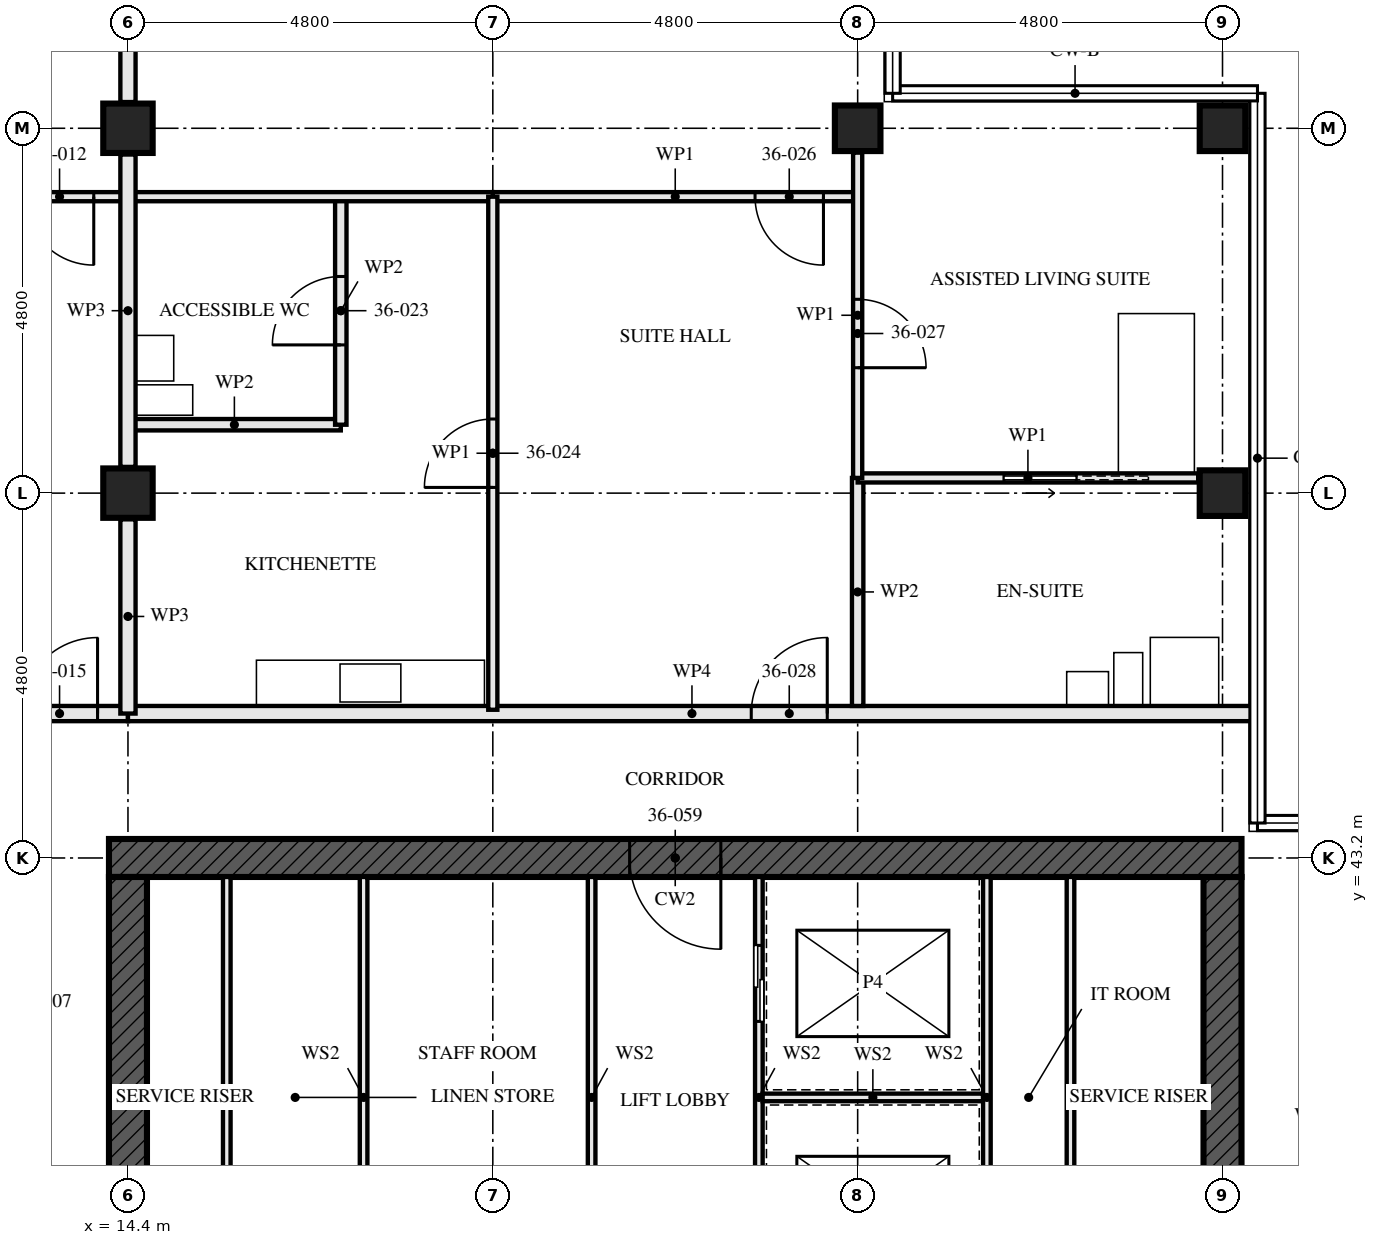
"""IFC4 building model, lengths in metres.
Left out: names, types, materials, properties, quantities, classifications, styles, units other than length and angle.
Written with IfcOpenShell. Run it as: python <this file> out.ifc"""

import sys

from ifc_helpers import new_model, si_unit, direction, frame, frame_2d, origin, origin_2d, place, context, subcontext, project, spatial, rectangle, hollow_rectangle, extrude, element, fill, save


model = new_model("IFC4")
c1 = context("Model", 3, precision=1e-05, world=origin(), true_north=direction((0.0, 1.0)))
c2 = subcontext(c1, "Body", "Model", "MODEL_VIEW")
j1 = project(units=[si_unit("LENGTHUNIT", "METRE"), si_unit("PLANEANGLEUNIT", "RADIAN")], contexts=[c1])
p1 = place(None, origin())
s1 = spatial("IfcSite", under=j1, at=p1, CompositionType="ELEMENT")
p2 = place(p1, origin())
s2 = spatial("IfcBuilding", under=s1, at=p2, CompositionType="ELEMENT")
p3 = place(p2, frame((0.0, 0.0, 133.0)))
s3 = spatial("IfcBuildingStorey", under=s2, at=p3, CompositionType="ELEMENT", Elevation=133.0)
for number, where, z_axis, x_axis in (
    (1, (14.4, 48.0, 0.0), (0.0, 0.0, 1.0), (1.0, 0.0, 0.0)),
    (2, (14.4, 52.8, 0.0), (0.0, 0.0, 1.0), (1.0, 0.0, 0.0)),
):
    element("IfcColumn", number, at=place(p3, frame(where, z_axis=z_axis, x_axis=x_axis)), inside=s3, PredefinedType="COLUMN", context=c2, shape_type="SweptSolid", body=[
        extrude(hollow_rectangle(XDim=0.65, YDim=0.65, WallThickness=0.05, at=origin_2d()), origin(), (0.0, 0.0, 1.0), 3.5),
    ])
for number, where, z_axis, x_axis in (
    (3, (24.0, 52.8, 0.0), (0.0, 0.0, 1.0), (0.0, 1.0, 0.0)),
    (4, (28.8, 48.0, 0.0), (0.0, 0.0, 1.0), (1.0, 0.0, 0.0)),
    (5, (28.8, 52.8, 0.0), (0.0, 0.0, 1.0), (0.0, 1.0, 0.0)),
):
    element("IfcColumn", number, at=place(p3, frame(where, z_axis=z_axis, x_axis=x_axis)), inside=s3, PredefinedType="COLUMN", context=c2, shape_type="SweptSolid", body=[
        extrude(hollow_rectangle(XDim=0.6, YDim=0.6, WallThickness=0.08, at=origin_2d()), origin(), (0.0, 0.0, 1.0), 3.5),
    ])
p4 = place(p3, frame((29.05, 43.2, -0.17), z_axis=(0.0, 0.0, 1.0), x_axis=(-1.0, 0.0, 0.0)))
e6 = element("IfcWall", 6, at=p4, inside=s3, PredefinedType="SHEAR", context=c2, shape_type="SweptSolid", body=[
    extrude(rectangle(XDim=14.9, YDim=0.5, at=frame_2d((7.45, 0.0))), origin(), (0.0, 0.0, 1.0), 3.42),
])
p5 = place(p4, frame((6.85, 0.0, 0.17)))
e7 = element("IfcOpeningElement", 7, at=p5, cuts=e6, PredefinedType="OPENING", context=c2, shape_type="SweptSolid", body=[
    extrude(rectangle(XDim=1.2, YDim=2.1, at=frame_2d((0.6, 1.05))), frame((0.0, 0.26, 0.0), z_axis=(0.0, -1.0, 0.0), x_axis=(1.0, 0.0, 0.0)), (0.0, 0.0, 1.0), 0.521),
])
p6 = place(p3, frame((14.4, 42.95, -0.17), z_axis=(0.0, 0.0, 1.0), x_axis=(0.0, -1.0, 0.0)))
e8 = element("IfcWall", 8, at=p6, inside=s3, PredefinedType="SHEAR", context=c2, shape_type="SweptSolid", body=[
    extrude(rectangle(XDim=13.9, YDim=0.5, at=frame_2d((6.95, 0.0))), origin(), (0.0, 0.0, 1.0), 3.42),
])
p7 = place(p6, frame((6.35, 0.0, 0.17)))
e9 = element("IfcOpeningElement", 9, at=p7, cuts=e8, PredefinedType="OPENING", context=c2, shape_type="SweptSolid", body=[
    extrude(rectangle(XDim=1.2, YDim=2.1, at=frame_2d((0.6, 1.05))), frame((0.0, 0.26, 0.0), z_axis=(0.0, -1.0, 0.0), x_axis=(1.0, 0.0, 0.0)), (0.0, 0.0, 1.0), 0.521),
])
p8 = place(p3, frame((28.8, 29.05, -0.17), z_axis=(0.0, 0.0, 1.0), x_axis=(0.0, 1.0, 0.0)))
e10 = element("IfcWall", 10, at=p8, inside=s3, PredefinedType="SHEAR", context=c2, shape_type="SweptSolid", body=[
    extrude(rectangle(XDim=13.9, YDim=0.5, at=frame_2d((6.95, 0.0))), origin(), (0.0, 0.0, 1.0), 3.42),
])
p9 = place(p8, frame((6.35, 0.0, 0.17)))
e11 = element("IfcOpeningElement", 11, at=p9, cuts=e10, PredefinedType="OPENING", context=c2, shape_type="SweptSolid", body=[
    extrude(rectangle(XDim=1.2, YDim=2.1, at=frame_2d((0.6, 1.05))), frame((0.0, 0.26, 0.0), z_axis=(0.0, -1.0, 0.0), x_axis=(1.0, 0.0, 0.0)), (0.0, 0.0, 1.0), 0.521),
])
p10 = place(p3, frame((14.4, 51.9, 0.0), z_axis=(0.0, 0.0, 1.0), x_axis=(-1.0, 0.0, 0.0)))
e12 = element("IfcWall", 12, at=p10, inside=s3, PredefinedType="PARTITIONING", context=c2, shape_type="SweptSolid", body=[
    extrude(rectangle(XDim=4.8, YDim=0.12, at=frame_2d((2.4, 0.0))), origin(), (0.0, 0.0, 1.0), 3.25),
])
p11 = place(p10, frame((0.45, 0.0, 0.0)))
e13 = element("IfcOpeningElement", 13, at=p11, cuts=e12, PredefinedType="OPENING", context=c2, shape_type="SweptSolid", body=[
    extrude(rectangle(XDim=0.9, YDim=2.1, at=frame_2d((0.45, 1.05))), frame((0.0, 0.071, 0.0), z_axis=(0.0, -1.0, 0.0), x_axis=(1.0, 0.0, 0.0)), (0.0, 0.0, 1.0), 0.141),
])
p12 = place(p10, frame((2.925, 0.0, 0.0)))
e14 = element("IfcOpeningElement", 14, at=p12, cuts=e12, PredefinedType="OPENING", context=c2, shape_type="SweptSolid", body=[
    extrude(rectangle(XDim=0.95, YDim=2.1, at=frame_2d((0.475, 1.05))), frame((0.0, 0.071, 0.0), z_axis=(0.0, -1.0, 0.0), x_axis=(1.0, 0.0, 0.0)), (0.0, 0.0, 1.0), 0.141),
])
p13 = place(p3, frame((14.4, 45.1, 0.0), z_axis=(0.0, 0.0, 1.0), x_axis=(-1.0, 0.0, 0.0)))
e15 = element("IfcWall", 15, at=p13, inside=s3, PredefinedType="PARTITIONING", context=c2, shape_type="SweptSolid", body=[
    extrude(rectangle(XDim=9.6, YDim=0.2, at=frame_2d((4.8, 0.0))), origin(), (0.0, 0.0, 1.0), 3.25),
])
p14 = place(p13, frame((0.4, 0.0, 0.0)))
e16 = element("IfcOpeningElement", 16, at=p14, cuts=e15, PredefinedType="OPENING", context=c2, shape_type="SweptSolid", body=[
    extrude(rectangle(XDim=1.0, YDim=2.1, at=frame_2d((0.5, 1.05))), frame((0.0, 0.111, 0.0), z_axis=(0.0, -1.0, 0.0), x_axis=(1.0, 0.0, 0.0)), (0.0, 0.0, 1.0), 0.221),
])
p15 = place(p3, frame((24.0, 48.2, 0.0), z_axis=(0.0, 0.0, 1.0), x_axis=(0.0, -1.0, 0.0)))
e17 = element("IfcWall", 17, at=p15, inside=s3, PredefinedType="PARTITIONING", context=c2, shape_type="SweptSolid", body=[
    extrude(rectangle(XDim=3.0, YDim=0.15, at=frame_2d((1.5, 0.0))), origin(), (0.0, 0.0, 1.0), 2.04),
])
p16 = place(p3, frame((17.2, 51.9, 0.0), z_axis=(0.0, 0.0, 1.0), x_axis=(0.0, -1.0, 0.0)))
e18 = element("IfcWall", 18, at=p16, inside=s3, PredefinedType="PARTITIONING", context=c2, shape_type="SweptSolid", body=[
    extrude(rectangle(XDim=3.0, YDim=0.15, at=frame_2d((1.5, 0.0))), origin(), (0.0, 0.0, 1.0), 3.25),
])
p17 = place(p16, frame((1.05, 0.0, 0.0)))
e19 = element("IfcOpeningElement", 19, at=p17, cuts=e18, PredefinedType="OPENING", context=c2, shape_type="SweptSolid", body=[
    extrude(rectangle(XDim=0.9, YDim=2.1, at=frame_2d((0.45, 1.05))), frame((0.0, 0.085, 0.0), z_axis=(0.0, -1.0, 0.0), x_axis=(1.0, 0.0, 0.0)), (0.0, 0.0, 1.0), 0.171),
])
p18 = place(p3, frame((17.2, 48.9, 0.0), z_axis=(0.0, 0.0, 1.0), x_axis=(-1.0, 0.0, 0.0)))
e20 = element("IfcWall", 20, at=p18, inside=s3, PredefinedType="PARTITIONING", context=c2, shape_type="SweptSolid", body=[
    extrude(rectangle(XDim=2.8, YDim=0.15, at=frame_2d((1.4, 0.0))), origin(), (0.0, 0.0, 1.0), 3.25),
])
p19 = place(p3, frame((19.2, 51.9, 0.0), z_axis=(0.0, 0.0, 1.0), x_axis=(0.0, -1.0, 0.0)))
e21 = element("IfcWall", 21, at=p19, inside=s3, PredefinedType="PARTITIONING", context=c2, shape_type="SweptSolid", body=[
    extrude(rectangle(XDim=6.75, YDim=0.12, at=frame_2d((3.375, 0.0))), origin(), (0.0, 0.0, 1.0), 2.04),
])
p20 = place(p19, frame((2.925, 0.0, 0.0)))
e22 = element("IfcOpeningElement", 22, at=p20, cuts=e21, PredefinedType="OPENING", context=c2, shape_type="SweptSolid", body=[
    extrude(rectangle(XDim=0.9, YDim=2.0, at=frame_2d((0.45, 1.0))), frame((0.0, 0.071, 0.0), z_axis=(0.0, -1.0, 0.0), x_axis=(1.0, 0.0, 0.0)), (0.0, 0.0, 1.0), 0.141),
])
p21 = place(p3, frame((28.48, 48.2, 0.0), z_axis=(0.0, 0.0, 1.0), x_axis=(-1.0, 0.0, 0.0)))
e23 = element("IfcWall", 23, at=p21, inside=s3, PredefinedType="PARTITIONING", context=c2, shape_type="SweptSolid", body=[
    extrude(rectangle(XDim=4.48, YDim=0.12, at=frame_2d((2.24, 0.0))), origin(), (0.0, 0.0, 1.0), 2.04),
])
p22 = place(p21, frame((1.605, 0.0, 0.0)))
e24 = element("IfcOpeningElement", 24, at=p22, cuts=e23, PredefinedType="OPENING", context=c2, shape_type="SweptSolid", body=[
    extrude(rectangle(XDim=0.95, YDim=2.0, at=frame_2d((0.475, 1.0))), frame((0.0, 0.071, 0.0), z_axis=(0.0, -1.0, 0.0), x_axis=(1.0, 0.0, 0.0)), (0.0, 0.0, 1.0), 0.141),
])
p23 = place(p3, frame((24.0, 51.9, 0.0), z_axis=(0.0, 0.0, 1.0), x_axis=(-1.0, 0.0, 0.0)))
e25 = element("IfcWall", 25, at=p23, inside=s3, PredefinedType="PARTITIONING", context=c2, shape_type="SweptSolid", body=[
    extrude(rectangle(XDim=4.8, YDim=0.12, at=frame_2d((2.4, 0.0))), origin(), (0.0, 0.0, 1.0), 3.25),
])
p24 = place(p23, frame((0.45, 0.0, 0.0)))
e26 = element("IfcOpeningElement", 26, at=p24, cuts=e25, PredefinedType="OPENING", context=c2, shape_type="SweptSolid", body=[
    extrude(rectangle(XDim=0.9, YDim=2.1, at=frame_2d((0.45, 1.05))), frame((0.0, 0.071, 0.0), z_axis=(0.0, -1.0, 0.0), x_axis=(1.0, 0.0, 0.0)), (0.0, 0.0, 1.0), 0.141),
])
p25 = place(p3, frame((19.2, 51.9, 0.0), z_axis=(0.0, 0.0, 1.0), x_axis=(-1.0, 0.0, 0.0)))
e27 = element("IfcWall", 27, at=p25, inside=s3, PredefinedType="PARTITIONING", context=c2, shape_type="SweptSolid", body=[
    extrude(rectangle(XDim=4.8, YDim=0.12, at=frame_2d((2.4, 0.0))), origin(), (0.0, 0.0, 1.0), 3.25),
])
p26 = place(p3, frame((24.0, 52.48, 0.0), z_axis=(0.0, 0.0, 1.0), x_axis=(0.0, -1.0, 0.0)))
e28 = element("IfcWall", 28, at=p26, inside=s3, PredefinedType="PARTITIONING", context=c2, shape_type="SweptSolid", body=[
    extrude(rectangle(XDim=4.28, YDim=0.12, at=frame_2d((2.14, 0.0))), origin(), (0.0, 0.0, 1.0), 3.25),
])
p27 = place(p26, frame((1.93, 0.0, 0.0)))
e29 = element("IfcOpeningElement", 29, at=p27, cuts=e28, PredefinedType="OPENING", context=c2, shape_type="SweptSolid", body=[
    extrude(rectangle(XDim=0.9, YDim=2.1, at=frame_2d((0.45, 1.05))), frame((0.0, 0.071, 0.0), z_axis=(0.0, -1.0, 0.0), x_axis=(1.0, 0.0, 0.0)), (0.0, 0.0, 1.0), 0.141),
])
p28 = place(p3, frame((29.24, 45.1, 0.0), z_axis=(0.0, 0.0, 1.0), x_axis=(-1.0, 0.0, 0.0)))
e30 = element("IfcWall", 30, at=p28, inside=s3, PredefinedType="PARTITIONING", context=c2, shape_type="SweptSolid", body=[
    extrude(rectangle(XDim=14.84, YDim=0.2, at=frame_2d((7.42, 0.0))), origin(), (0.0, 0.0, 1.0), 2.04),
])
p29 = place(p28, frame((5.64, 0.0, 0.0)))
e31 = element("IfcOpeningElement", 31, at=p29, cuts=e30, PredefinedType="OPENING", context=c2, shape_type="SweptSolid", body=[
    extrude(rectangle(XDim=1.0, YDim=2.0, at=frame_2d((0.5, 1.0))), frame((0.0, 0.111, 0.0), z_axis=(0.0, -1.0, 0.0), x_axis=(1.0, 0.0, 0.0)), (0.0, 0.0, 1.0), 0.221),
])
for number, where, z_axis, x_axis in (
    (32, (15.7, 37.15, 0.0), (0.0, 0.0, 1.0), (0.0, 1.0, 0.0)),
    (33, (26.8, 37.15, 0.0), (0.0, 0.0, 1.0), (0.0, 1.0, 0.0)),
):
    element("IfcWall", number, at=place(p3, frame(where, z_axis=z_axis, x_axis=x_axis)), inside=s3, PredefinedType="SOLIDWALL", context=c2, shape_type="SweptSolid", body=[
        extrude(rectangle(XDim=5.8, YDim=0.1, at=frame_2d((2.9, 0.0))), origin(), (0.0, 0.0, 1.0), 3.25),
    ])
p30 = place(p3, frame((20.5, 37.15, 0.0), z_axis=(0.0, 0.0, 1.0), x_axis=(0.0, 1.0, 0.0)))
e34 = element("IfcWall", 34, at=p30, inside=s3, PredefinedType="SOLIDWALL", context=c2, shape_type="SweptSolid", body=[
    extrude(rectangle(XDim=5.8, YDim=0.1, at=frame_2d((2.9, 0.0))), origin(), (0.0, 0.0, 1.0), 3.25),
])
p31 = place(p30, frame((0.975, 0.0, 0.0)))
e35 = element("IfcOpeningElement", 35, at=p31, cuts=e34, PredefinedType="OPENING", context=c2, shape_type="SweptSolid", body=[
    extrude(rectangle(XDim=0.9, YDim=2.1, at=frame_2d((0.45, 1.05))), frame((0.0, 0.061, 0.0), z_axis=(0.0, -1.0, 0.0), x_axis=(1.0, 0.0, 0.0)), (0.0, 0.0, 1.0), 0.121),
])
p32 = place(p3, frame((22.7, 37.15, 0.0), z_axis=(0.0, 0.0, 1.0), x_axis=(0.0, 1.0, 0.0)))
e36 = element("IfcWall", 36, at=p32, inside=s3, PredefinedType="SOLIDWALL", context=c2, shape_type="SweptSolid", body=[
    extrude(rectangle(XDim=5.8, YDim=0.1, at=frame_2d((2.9, 0.0))), origin(), (0.0, 0.0, 1.0), 3.25),
])
p33 = place(p32, frame((0.925, 0.0, 0.0)))
e37 = element("IfcOpeningElement", 37, at=p33, cuts=e36, PredefinedType="OPENING", context=c2, shape_type="SweptSolid", body=[
    extrude(rectangle(XDim=1.0, YDim=2.1, at=frame_2d((0.5, 1.05))), frame((0.0, 0.061, 0.0), z_axis=(0.0, -1.0, 0.0), x_axis=(1.0, 0.0, 0.0)), (0.0, 0.0, 1.0), 0.121),
])
p34 = place(p32, frame((3.9, 0.0, 0.0)))
e38 = element("IfcOpeningElement", 38, at=p34, cuts=e36, PredefinedType="OPENING", context=c2, shape_type="SweptSolid", body=[
    extrude(rectangle(XDim=1.0, YDim=2.1, at=frame_2d((0.5, 1.05))), frame((0.0, 0.061, 0.0), z_axis=(0.0, -1.0, 0.0), x_axis=(1.0, 0.0, 0.0)), (0.0, 0.0, 1.0), 0.121),
])
p35 = place(p3, frame((17.5, 37.15, 0.0), z_axis=(0.0, 0.0, 1.0), x_axis=(0.0, 1.0, 0.0)))
e39 = element("IfcWall", 39, at=p35, inside=s3, PredefinedType="SOLIDWALL", context=c2, shape_type="SweptSolid", body=[
    extrude(rectangle(XDim=5.8, YDim=0.1, at=frame_2d((2.9, 0.0))), origin(), (0.0, 0.0, 1.0), 3.25),
])
p36 = place(p3, frame((22.75, 40.05, 0.0), z_axis=(0.0, 0.0, 1.0), x_axis=(1.0, 0.0, 0.0)))
e40 = element("IfcWall", 40, at=p36, inside=s3, PredefinedType="SOLIDWALL", context=c2, shape_type="SweptSolid", body=[
    extrude(rectangle(XDim=2.9, YDim=0.1, at=frame_2d((1.45, 0.0))), origin(), (0.0, 0.0, 1.0), 3.25),
])
p37 = place(p3, frame((25.7, 37.15, 0.0), z_axis=(0.0, 0.0, 1.0), x_axis=(0.0, 1.0, 0.0)))
e41 = element("IfcWall", 41, at=p37, inside=s3, PredefinedType="SOLIDWALL", context=c2, shape_type="SweptSolid", body=[
    extrude(rectangle(XDim=5.8, YDim=0.1, at=frame_2d((2.9, 0.0))), origin(), (0.0, 0.0, 1.0), 3.25),
])
p38 = place(p3, frame((14.4, 45.1, 0.0), z_axis=(0.0, 0.0, 1.0), x_axis=(0.0, 1.0, 0.0)))
e42 = element("IfcWall", 42, at=p38, inside=s3, PredefinedType="PARTITIONING", context=c2, shape_type="SweptSolid", body=[
    extrude(rectangle(XDim=2.555, YDim=0.2, at=frame_2d((1.277, 0.0))), origin(), (0.0, 0.0, 1.0), 2.04),
])
p39 = place(p3, frame((14.4, 48.345, 0.0), z_axis=(0.0, 0.0, 1.0), x_axis=(0.0, 1.0, 0.0)))
e43 = element("IfcWall", 43, at=p39, inside=s3, PredefinedType="PARTITIONING", context=c2, shape_type="SweptSolid", body=[
    extrude(rectangle(XDim=4.11, YDim=0.2, at=frame_2d((2.055, 0.0))), origin(), (0.0, 0.0, 1.0), 2.04),
])
p40 = place(p3, frame((14.4, 53.145, 0.0), z_axis=(0.0, 0.0, 1.0), x_axis=(0.0, 1.0, 0.0)))
e44 = element("IfcWall", 44, at=p40, inside=s3, PredefinedType="PARTITIONING", context=c2, shape_type="SweptSolid", body=[
    extrude(rectangle(XDim=4.135, YDim=0.2, at=frame_2d((2.067, 0.0))), origin(), (0.0, 0.0, 1.0), 2.04),
])
p41 = place(p11, origin())
e45 = element("IfcDoor", 45, at=p41, inside=s3, OperationType="SINGLE_SWING_RIGHT", PredefinedType="DOOR", context=c2, shape_type="SweptSolid", body=[
    extrude(rectangle(XDim=0.9, YDim=2.1, at=frame_2d((0.45, 1.05))), frame((0.0, 0.022, 0.0), z_axis=(0.0, -1.0, 0.0), x_axis=(1.0, 0.0, 0.0)), (0.0, 0.0, 1.0), 0.044),
])
fill(e13, e45)
p42 = place(p14, frame((1.0, 0.0, 0.0), z_axis=(0.0, 0.0, 1.0), x_axis=(-1.0, 0.0, 0.0)))
e46 = element("IfcDoor", 46, at=p42, inside=s3, OperationType="SINGLE_SWING_LEFT", PredefinedType="DOOR", context=c2, shape_type="SweptSolid", body=[
    extrude(rectangle(XDim=1.0, YDim=2.1, at=frame_2d((0.5, 1.05))), frame((0.0, 0.027, 0.0), z_axis=(0.0, -1.0, 0.0), x_axis=(1.0, 0.0, 0.0)), (0.0, 0.0, 1.0), 0.054),
])
fill(e16, e46)
p43 = place(p17, frame((0.9, 0.0, 0.0), z_axis=(0.0, 0.0, 1.0), x_axis=(-1.0, 0.0, 0.0)))
e47 = element("IfcDoor", 47, at=p43, inside=s3, OperationType="SINGLE_SWING_RIGHT", PredefinedType="DOOR", context=c2, shape_type="SweptSolid", body=[
    extrude(rectangle(XDim=0.9, YDim=2.1, at=frame_2d((0.45, 1.05))), frame((0.0, 0.022, 0.0), z_axis=(0.0, -1.0, 0.0), x_axis=(1.0, 0.0, 0.0)), (0.0, 0.0, 1.0), 0.044),
])
fill(e19, e47)
p44 = place(p20, frame((0.9, 0.0, 0.0), z_axis=(0.0, 0.0, 1.0), x_axis=(-1.0, 0.0, 0.0)))
e48 = element("IfcDoor", 48, at=p44, inside=s3, OperationType="SINGLE_SWING_RIGHT", PredefinedType="DOOR", context=c2, shape_type="SweptSolid", body=[
    extrude(rectangle(XDim=0.9, YDim=2.0, at=frame_2d((0.45, 1.0))), frame((0.0, 0.022, 0.0), z_axis=(0.0, -1.0, 0.0), x_axis=(1.0, 0.0, 0.0)), (0.0, 0.0, 1.0), 0.044),
])
fill(e22, e48)
p45 = place(p22, origin())
e49 = element("IfcDoor", 49, at=p45, inside=s3, OperationType="SLIDING_TO_RIGHT", PredefinedType="DOOR", context=c2, shape_type="SweptSolid", body=[
    extrude(rectangle(XDim=0.95, YDim=2.0, at=frame_2d((0.475, 1.0))), frame((0.0, 0.022, 0.0), z_axis=(0.0, -1.0, 0.0), x_axis=(1.0, 0.0, 0.0)), (0.0, 0.0, 1.0), 0.044),
])
fill(e24, e49)
p46 = place(p24, origin())
e50 = element("IfcDoor", 50, at=p46, inside=s3, OperationType="SINGLE_SWING_RIGHT", PredefinedType="DOOR", context=c2, shape_type="SweptSolid", body=[
    extrude(rectangle(XDim=0.9, YDim=2.1, at=frame_2d((0.45, 1.05))), frame((0.0, 0.022, 0.0), z_axis=(0.0, -1.0, 0.0), x_axis=(1.0, 0.0, 0.0)), (0.0, 0.0, 1.0), 0.044),
])
fill(e26, e50)
p47 = place(p27, origin())
e51 = element("IfcDoor", 51, at=p47, inside=s3, OperationType="SINGLE_SWING_LEFT", PredefinedType="DOOR", context=c2, shape_type="SweptSolid", body=[
    extrude(rectangle(XDim=0.9, YDim=2.1, at=frame_2d((0.45, 1.05))), frame((0.0, 0.022, 0.0), z_axis=(0.0, -1.0, 0.0), x_axis=(1.0, 0.0, 0.0)), (0.0, 0.0, 1.0), 0.044),
])
fill(e29, e51)
p48 = place(p29, frame((1.0, 0.0, 0.0), z_axis=(0.0, 0.0, 1.0), x_axis=(-1.0, 0.0, 0.0)))
e52 = element("IfcDoor", 52, at=p48, inside=s3, OperationType="SINGLE_SWING_LEFT", PredefinedType="DOOR", context=c2, shape_type="SweptSolid", body=[
    extrude(rectangle(XDim=1.0, YDim=2.0, at=frame_2d((0.5, 1.0))), frame((0.0, 0.027, 0.0), z_axis=(0.0, -1.0, 0.0), x_axis=(1.0, 0.0, 0.0)), (0.0, 0.0, 1.0), 0.054),
])
fill(e31, e52)
p49 = place(p34, origin())
e53 = element("IfcDoor", 53, at=p49, inside=s3, OperationType="SLIDING_TO_LEFT", PredefinedType="DOOR", context=c2, shape_type="SweptSolid", body=[
    extrude(rectangle(XDim=1.0, YDim=2.1, at=frame_2d((0.5, 1.05))), frame((0.0, 0.05, 0.0), z_axis=(0.0, -1.0, 0.0), x_axis=(1.0, 0.0, 0.0)), (0.0, 0.0, 1.0), 0.1),
])
fill(e38, e53)
p50 = place(p5, origin())
e54 = element("IfcDoor", 54, at=p50, inside=s3, OperationType="SINGLE_SWING_LEFT", PredefinedType="DOOR", context=c2, shape_type="SweptSolid", body=[
    extrude(rectangle(XDim=1.2, YDim=2.1, at=frame_2d((0.6, 1.05))), frame((0.0, 0.027, 0.0), z_axis=(0.0, -1.0, 0.0), x_axis=(1.0, 0.0, 0.0)), (0.0, 0.0, 1.0), 0.054),
])
fill(e7, e54)
save(model, sys.argv[1])
